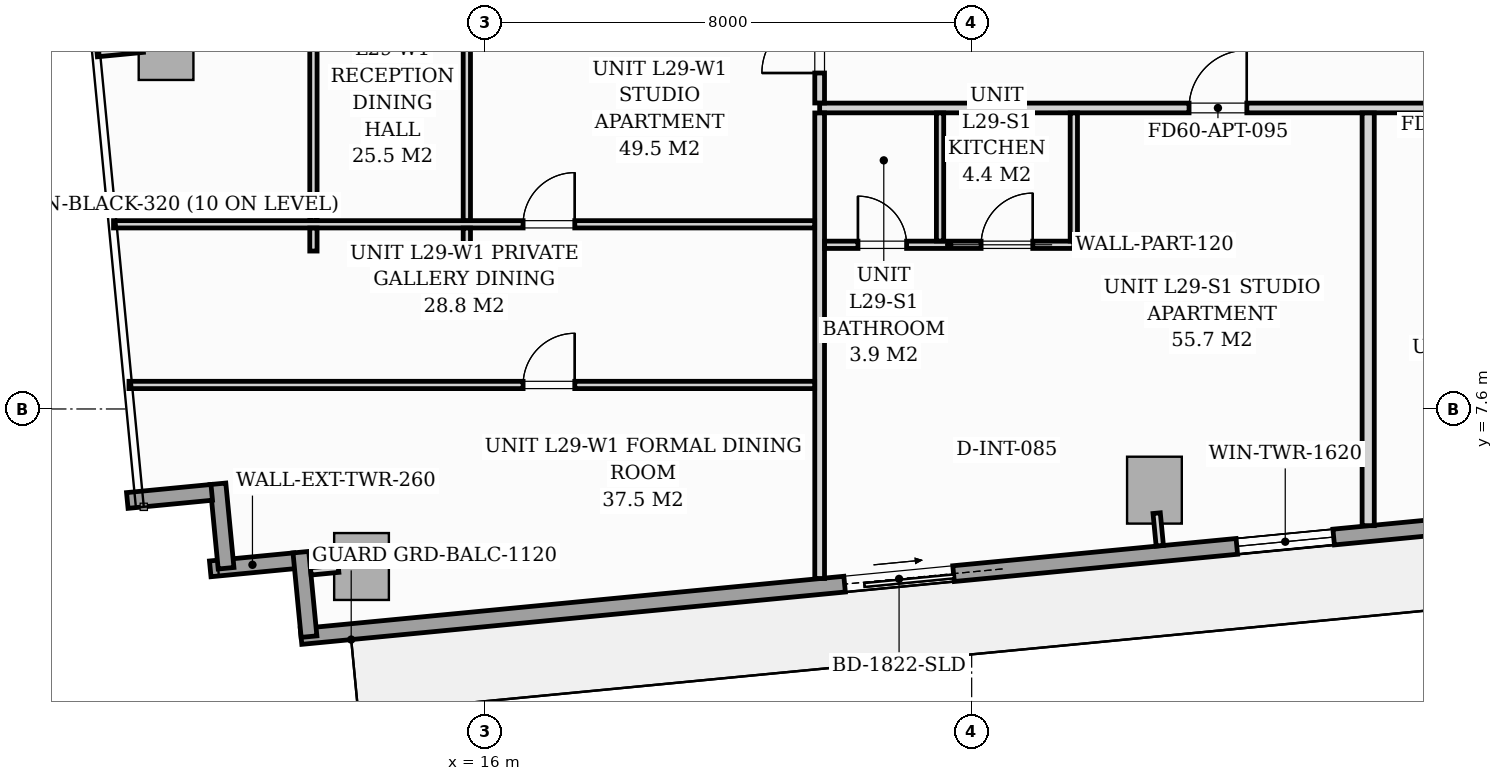
"""IFC4 building model, lengths in metres.
Left out: names, types, materials, properties, quantities, classifications, styles, units other than length and angle.
Written with IfcOpenShell. Run it as: python <this file> out.ifc"""

import sys

from ifc_helpers import new_model, si_unit, direction, frame, frame_2d, origin, origin_2d, place, context, subcontext, project, spatial, rectangle, extrude, source, transform, mapped, element, fill, save


model = new_model("IFC4")
c1 = context("Model", 3, precision=1e-05, world=origin(), true_north=direction((0.0, 1.0)))
c2 = subcontext(c1, "Body", "Model", "MODEL_VIEW")
j1 = project(units=[si_unit("LENGTHUNIT", "METRE"), si_unit("PLANEANGLEUNIT", "RADIAN")], contexts=[c1])
p1 = place(None, origin())
s1 = spatial("IfcSite", under=j1, at=p1, CompositionType="ELEMENT")
p2 = place(p1, origin())
s2 = spatial("IfcBuilding", under=s1, at=p2, CompositionType="ELEMENT")
p3 = place(p2, frame((0.0, 0.0, 103.4)))
s3 = spatial("IfcBuildingStorey", under=s2, at=p3, CompositionType="ELEMENT", Elevation=103.4)
m1 = source(origin(), c2, "Body", "SweptSolid", [
    extrude(rectangle(XDim=0.9, YDim=1.1, at=origin_2d()), origin(), (0.0, 0.0, 1.0), 3.196),
])
for number, where, z_axis, x_axis in (
    (1, (13.966, 5.01, 0.002), (0.0, 0.0, 1.0), (0.995, 0.096, 0.0)),
    (2, (27.006, 6.265, 0.002), (0.0, 0.0, 1.0), (0.995, 0.096, 0.0)),
    (3, (10.752, 13.561, 0.002), (0.0, 0.0, 1.0), (0.995, 0.096, 0.0)),
):
    element("IfcColumn", number, at=place(p3, frame(where, z_axis=z_axis, x_axis=x_axis)), inside=s3, PredefinedType="COLUMN", context=c2, shape_type="MappedRepresentation", body=[
        mapped(m1, transform((0.0, 0.0, 0.0), scale=1.0)),
    ])
for number, where, z_axis, x_axis in (
    (4, (12.867, 5.104, 0.0), (0.0, 0.0, 1.0), (-0.995, -0.096, 0.0)),
    (5, (11.739, 4.981, 0.0), (0.0, 0.0, 1.0), (-0.096, 0.995, 0.0)),
):
    element("IfcWall", number, at=place(p3, frame(where, z_axis=z_axis, x_axis=x_axis)), inside=s3, PredefinedType="STANDARD", context=c2, shape_type="SweptSolid", body=[
        extrude(rectangle(XDim=1.395, YDim=0.26, at=frame_2d((0.697, 0.0))), origin(), (0.0, 0.0, 1.0), 2.94),
    ])
p4 = place(p3, frame((11.503, 6.229, 0.0), z_axis=(0.0, 0.0, 1.0), x_axis=(-0.995391056452, -0.09589913835, 0.0)))
e6 = element("IfcWall", 6, at=p4, inside=s3, PredefinedType="STANDARD", context=c2, shape_type="SweptSolid", body=[
    extrude(rectangle(XDim=1.395, YDim=0.26, at=frame_2d((0.698, 0.0))), origin(), (0.0, 0.0, 1.0), 2.94),
])
p5 = place(p3, frame((31.994, 5.69, 0.0), z_axis=(0.0, 0.0, 1.0), x_axis=(-0.995396521236, -0.095842399342, 0.0)))
e7 = element("IfcWall", 7, at=p5, inside=s3, PredefinedType="STANDARD", context=c2, shape_type="SweptSolid", body=[
    extrude(rectangle(XDim=19.11, YDim=0.26, at=frame_2d((9.555, 0.0))), origin(), (0.0, 0.0, 1.0), 2.94),
])
p6 = place(p5, frame((8.33, 0.0, 0.0)))
e8 = element("IfcOpeningElement", 8, at=p6, cuts=e7, PredefinedType="OPENING", context=c2, shape_type="SweptSolid", body=[
    extrude(rectangle(XDim=1.8, YDim=2.06, at=frame_2d((0.9, 1.03))), frame((0.0, 0.14, 0.0), z_axis=(0.0, -1.0, 0.0), x_axis=(1.0, 0.0, 0.0)), (0.0, 0.0, 1.0), 0.28),
])
p7 = place(p5, frame((2.05, 0.0, 0.65)))
e9 = element("IfcOpeningElement", 9, at=p7, cuts=e7, PredefinedType="OPENING", context=c2, shape_type="SweptSolid", body=[
    extrude(rectangle(XDim=1.6, YDim=1.5, at=frame_2d((0.8, 0.75))), frame((0.0, 0.14, 0.0), z_axis=(0.0, -1.0, 0.0), x_axis=(1.0, 0.0, 0.0)), (0.0, 0.0, 1.0), 0.28),
])
p8 = place(p3, frame((13.103, 3.856, 0.0), z_axis=(0.0, 0.0, 1.0), x_axis=(-0.09589913835, 0.995391056452, 0.0)))
e10 = element("IfcWall", 10, at=p8, inside=s3, PredefinedType="STANDARD", context=c2, shape_type="SweptSolid", body=[
    extrude(rectangle(XDim=1.395, YDim=0.26, at=frame_2d((0.698, 0.0))), origin(), (0.0, 0.0, 1.0), 2.94),
])
p9 = place(p3, frame((21.5, 12.55, 0.0), z_axis=(0.0, 0.0, 1.0), x_axis=(1.0, 0.0, 0.0)))
e11 = element("IfcWall", 11, at=p9, inside=s3, PredefinedType="PARTITIONING", context=c2, shape_type="SweptSolid", body=[
    extrude(rectangle(XDim=24.38, YDim=0.16, at=frame_2d((12.19, 0.0))), origin(), (0.0, 0.0, 1.0), 2.94),
])
p10 = place(p9, frame((6.075, 0.0, 0.0)))
e12 = element("IfcOpeningElement", 12, at=p10, cuts=e11, PredefinedType="OPENING", context=c2, shape_type="SweptSolid", body=[
    extrude(rectangle(XDim=0.95, YDim=2.06, at=frame_2d((0.475, 1.03))), frame((0.0, 0.09, 0.0), z_axis=(0.0, -1.0, 0.0), x_axis=(1.0, 0.0, 0.0)), (0.0, 0.0, 1.0), 0.18),
])
p11 = place(p9, frame((10.519, 0.0, 0.0)))
e13 = element("IfcOpeningElement", 13, at=p11, cuts=e11, PredefinedType="OPENING", context=c2, shape_type="SweptSolid", body=[
    extrude(rectangle(XDim=0.95, YDim=2.06, at=frame_2d((0.475, 1.03))), frame((0.0, 0.09, 0.0), z_axis=(0.0, -1.0, 0.0), x_axis=(1.0, 0.0, 0.0)), (0.0, 0.0, 1.0), 0.18),
])
p12 = place(p9, frame((18.208, 0.0, 0.0)))
e14 = element("IfcOpeningElement", 14, at=p12, cuts=e11, PredefinedType="OPENING", context=c2, shape_type="SweptSolid", body=[
    extrude(rectangle(XDim=0.95, YDim=2.06, at=frame_2d((0.475, 1.03))), frame((0.0, 0.09, 0.0), z_axis=(0.0, -1.0, 0.0), x_axis=(1.0, 0.0, 0.0)), (0.0, 0.0, 1.0), 0.18),
])
p13 = place(p3, frame((21.5, 4.812, 0.0), z_axis=(0.0, 0.0, 1.0), x_axis=(0.0, 1.0, 0.0)))
e15 = element("IfcWall", 15, at=p13, inside=s3, PredefinedType="PARTITIONING", context=c2, shape_type="SweptSolid", body=[
    extrude(rectangle(XDim=7.656, YDim=0.16, at=frame_2d((3.828, 0.0))), origin(), (0.0, 0.0, 1.0), 2.94),
])
p14 = place(p3, frame((21.5, 12.632, 0.0), z_axis=(0.0, 0.0, 1.0), x_axis=(0.0, 1.0, 0.0)))
e16 = element("IfcWall", 16, at=p14, inside=s3, PredefinedType="PARTITIONING", context=c2, shape_type="SweptSolid", body=[
    extrude(rectangle(XDim=11.747, YDim=0.16, at=frame_2d((5.873, 0.0))), origin(), (0.0, 0.0, 1.0), 2.94),
])
p15 = place(p14, frame((0.493, 0.0, 0.0)))
e17 = element("IfcOpeningElement", 17, at=p15, cuts=e16, PredefinedType="OPENING", context=c2, shape_type="SweptSolid", body=[
    extrude(rectangle(XDim=0.95, YDim=2.06, at=frame_2d((0.475, 1.03))), frame((0.0, 0.09, 0.0), z_axis=(0.0, -1.0, 0.0), x_axis=(1.0, 0.0, 0.0)), (0.0, 0.0, 1.0), 0.18),
])
p16 = place(p3, frame((21.582, 10.3, 0.0), z_axis=(0.0, 0.0, 1.0), x_axis=(1.0, 0.0, 0.0)))
e18 = element("IfcWall", 18, at=p16, inside=s3, PredefinedType="PARTITIONING", context=c2, shape_type="SweptSolid", body=[
    extrude(rectangle(XDim=4.098, YDim=0.12, at=frame_2d((2.049, 0.0))), origin(), (0.0, 0.0, 1.0), 2.94),
])
p17 = place(p16, frame((0.548, 0.0, 0.0)))
e19 = element("IfcOpeningElement", 19, at=p17, cuts=e18, PredefinedType="OPENING", context=c2, shape_type="SweptSolid", body=[
    extrude(rectangle(XDim=0.8, YDim=2.02, at=frame_2d((0.4, 1.01))), frame((0.0, 0.07, 0.0), z_axis=(0.0, -1.0, 0.0), x_axis=(1.0, 0.0, 0.0)), (0.0, 0.0, 1.0), 0.14),
])
p18 = place(p16, frame((2.573, 0.0, 0.0)))
e20 = element("IfcOpeningElement", 20, at=p18, cuts=e18, PredefinedType="OPENING", context=c2, shape_type="SweptSolid", body=[
    extrude(rectangle(XDim=0.85, YDim=2.05, at=frame_2d((0.425, 1.025))), frame((0.0, 0.07, 0.0), z_axis=(0.0, -1.0, 0.0), x_axis=(1.0, 0.0, 0.0)), (0.0, 0.0, 1.0), 0.14),
])
for number, where, z_axis, x_axis in (
    (21, (25.68, 10.362, 0.0), (0.0, 0.0, 1.0), (0.0, 1.0, 0.0)),
    (22, (23.48, 10.362, 0.0), (0.0, 0.0, 1.0), (0.0, 1.0, 0.0)),
):
    element("IfcWall", number, at=place(p3, frame(where, z_axis=z_axis, x_axis=x_axis)), inside=s3, PredefinedType="PARTITIONING", context=c2, shape_type="SweptSolid", body=[
        extrude(rectangle(XDim=2.106, YDim=0.12, at=frame_2d((1.053, 0.0))), origin(), (0.0, 0.0, 1.0), 2.94),
    ])
p19 = place(p3, frame((30.521, 5.681, 0.0), z_axis=(0.0, 0.0, 1.0), x_axis=(0.0, 1.0, 0.0)))
e23 = element("IfcWall", 23, at=p19, inside=s3, PredefinedType="PARTITIONING", context=c2, shape_type="SweptSolid", body=[
    extrude(rectangle(XDim=6.787, YDim=0.2, at=frame_2d((3.394, 0.0))), origin(), (0.0, 0.0, 1.0), 2.94),
])
p20 = place(p3, frame((10.142, 7.995, 0.0), z_axis=(0.0, 0.0, 1.0), x_axis=(1.0, 0.0, 0.0)))
e24 = element("IfcWall", 24, at=p20, inside=s3, PredefinedType="PARTITIONING", context=c2, shape_type="SweptSolid", body=[
    extrude(rectangle(XDim=11.276, YDim=0.12, at=frame_2d((5.638, 0.0))), origin(), (0.0, 0.0, 1.0), 2.94),
])
p21 = place(p20, frame((6.481, 0.0, 0.0)))
e25 = element("IfcOpeningElement", 25, at=p21, cuts=e24, PredefinedType="OPENING", context=c2, shape_type="SweptSolid", body=[
    extrude(rectangle(XDim=0.85, YDim=2.05, at=frame_2d((0.425, 1.025))), frame((0.0, 0.07, 0.0), z_axis=(0.0, -1.0, 0.0), x_axis=(1.0, 0.0, 0.0)), (0.0, 0.0, 1.0), 0.14),
])
p22 = place(p3, frame((9.888, 10.637, 0.0), z_axis=(0.0, 0.0, 1.0), x_axis=(1.0, 0.0, 0.0)))
e26 = element("IfcWall", 26, at=p22, inside=s3, PredefinedType="PARTITIONING", context=c2, shape_type="SweptSolid", body=[
    extrude(rectangle(XDim=11.53, YDim=0.12, at=frame_2d((5.765, 0.0))), origin(), (0.0, 0.0, 1.0), 2.94),
])
p23 = place(p22, frame((6.735, 0.0, 0.0)))
e27 = element("IfcOpeningElement", 27, at=p23, cuts=e26, PredefinedType="OPENING", context=c2, shape_type="SweptSolid", body=[
    extrude(rectangle(XDim=0.85, YDim=2.05, at=frame_2d((0.425, 1.025))), frame((0.0, 0.07, 0.0), z_axis=(0.0, -1.0, 0.0), x_axis=(1.0, 0.0, 0.0)), (0.0, 0.0, 1.0), 0.14),
])
p24 = place(p3, frame((13.175, 10.197, 0.0), z_axis=(0.0, 0.0, 1.0), x_axis=(0.0, 1.0, 0.0)))
e28 = element("IfcWall", 28, at=p24, inside=s3, PredefinedType="PARTITIONING", context=c2, shape_type="SweptSolid", body=[
    extrude(rectangle(XDim=0.378, YDim=0.12, at=frame_2d((0.189, 0.0))), origin(), (0.0, 0.0, 1.0), 2.94),
])
p25 = place(p3, frame((13.175, 10.699, 0.0), z_axis=(0.0, 0.0, 1.0), x_axis=(0.0, 1.0, 0.0)))
e29 = element("IfcWall", 29, at=p25, inside=s3, PredefinedType="PARTITIONING", context=c2, shape_type="SweptSolid", body=[
    extrude(rectangle(XDim=10.61, YDim=0.12, at=frame_2d((5.305, 0.0))), origin(), (0.0, 0.0, 1.0), 2.94),
])
p26 = place(p25, frame((4.88, 0.0, 0.0)))
e30 = element("IfcOpeningElement", 30, at=p26, cuts=e29, PredefinedType="OPENING", context=c2, shape_type="SweptSolid", body=[
    extrude(rectangle(XDim=0.85, YDim=2.05, at=frame_2d((0.425, 1.025))), frame((0.0, 0.07, 0.0), z_axis=(0.0, -1.0, 0.0), x_axis=(1.0, 0.0, 0.0)), (0.0, 0.0, 1.0), 0.14),
])
p27 = place(p3, frame((15.698, 10.197, 0.0), z_axis=(0.0, 0.0, 1.0), x_axis=(0.0, 1.0, 0.0)))
e31 = element("IfcWall", 31, at=p27, inside=s3, PredefinedType="PARTITIONING", context=c2, shape_type="SweptSolid", body=[
    extrude(rectangle(XDim=0.378, YDim=0.12, at=frame_2d((0.189, 0.0))), origin(), (0.0, 0.0, 1.0), 2.94),
])
p28 = place(p3, frame((15.698, 10.699, 0.0), z_axis=(0.0, 0.0, 1.0), x_axis=(0.0, 1.0, 0.0)))
e32 = element("IfcWall", 32, at=p28, inside=s3, PredefinedType="PARTITIONING", context=c2, shape_type="SweptSolid", body=[
    extrude(rectangle(XDim=10.61, YDim=0.12, at=frame_2d((5.305, 0.0))), origin(), (0.0, 0.0, 1.0), 2.94),
])
p29 = place(p28, frame((4.88, 0.0, 0.0)))
e33 = element("IfcOpeningElement", 33, at=p29, cuts=e32, PredefinedType="OPENING", context=c2, shape_type="SweptSolid", body=[
    extrude(rectangle(XDim=0.85, YDim=2.05, at=frame_2d((0.425, 1.025))), frame((0.0, 0.07, 0.0), z_axis=(0.0, -1.0, 0.0), x_axis=(1.0, 0.0, 0.0)), (0.0, 0.0, 1.0), 0.14),
])
p30 = place(p3, frame((13.588, 4.973, 0.0), z_axis=(0.0, 0.0, 1.0), x_axis=(-0.995435366701, -0.095438098896, 0.0)))
e34 = element("IfcWall", 34, at=p30, inside=s3, PredefinedType="PARTITIONING", context=c2, shape_type="SweptSolid", body=[
    extrude(rectangle(XDim=0.458, YDim=0.12, at=frame_2d((0.229, 0.0))), origin(), (0.0, 0.0, 1.0), 2.94),
])
p31 = place(p3, frame((27.042, 5.887, 0.0), z_axis=(0.0, 0.0, 1.0), x_axis=(0.096222656154, -0.995359834654, 0.0)))
e35 = element("IfcWall", 35, at=p31, inside=s3, PredefinedType="PARTITIONING", context=c2, shape_type="SweptSolid", body=[
    extrude(rectangle(XDim=0.538, YDim=0.12, at=frame_2d((0.269, 0.0))), origin(), (0.0, 0.0, 1.0), 2.94),
])
p32 = place(p3, frame((10.373, 13.524, 0.0), z_axis=(0.0, 0.0, 1.0), x_axis=(-0.995377786728, -0.096036772582, 0.0)))
e36 = element("IfcWall", 36, at=p32, inside=s3, PredefinedType="PARTITIONING", context=c2, shape_type="SweptSolid", body=[
    extrude(rectangle(XDim=0.76, YDim=0.12, at=frame_2d((0.38, 0.0))), origin(), (0.0, 0.0, 1.0), 2.94),
])
m2 = source(origin(), c2, "Body", "SweptSolid", [
    extrude(rectangle(XDim=1.8, YDim=2.06, at=frame_2d((0.9, 1.03))), frame((0.0, 0.025, 0.0), z_axis=(0.0, -1.0, 0.0), x_axis=(1.0, 0.0, 0.0)), (0.0, 0.0, 1.0), 0.05),
])
p33 = place(p6, origin())
e37 = element("IfcDoor", 37, at=p33, inside=s3, OperationType="SLIDING_TO_LEFT", PredefinedType="DOOR", context=c2, shape_type="MappedRepresentation", body=[
    mapped(m2, transform((0.0, 0.0, 0.0), scale=1.0)),
])
fill(e8, e37)
m3 = source(origin(), c2, "Body", "SweptSolid", [
    extrude(rectangle(XDim=1.6, YDim=1.5, at=frame_2d((0.8, 0.75))), frame((0.0, 0.03, 0.0), z_axis=(0.0, -1.0, 0.0), x_axis=(1.0, 0.0, 0.0)), (0.0, 0.0, 1.0), 0.06),
])
p34 = place(p7, origin())
e38 = element("IfcWindow", 38, at=p34, inside=s3, PartitioningType="SINGLE_PANEL", PredefinedType="WINDOW", context=c2, shape_type="MappedRepresentation", body=[
    mapped(m3, transform((0.0, 0.0, 0.0), scale=1.0)),
])
fill(e9, e38)
m4 = source(origin(), c2, "Body", "SweptSolid", [
    extrude(rectangle(XDim=0.95, YDim=2.06, at=frame_2d((0.475, 1.03))), frame((0.0, 0.025, 0.0), z_axis=(0.0, -1.0, 0.0), x_axis=(1.0, 0.0, 0.0)), (0.0, 0.0, 1.0), 0.05),
])
p35 = place(p10, origin())
e39 = element("IfcDoor", 39, at=p35, inside=s3, OperationType="SINGLE_SWING_RIGHT", PredefinedType="DOOR", context=c2, shape_type="MappedRepresentation", body=[
    mapped(m4, transform((0.0, 0.0, 0.0), scale=1.0)),
])
fill(e12, e39)
m5 = source(origin(), c2, "Body", "SweptSolid", [
    extrude(rectangle(XDim=0.8, YDim=2.02, at=frame_2d((0.4, 1.01))), frame((0.0, 0.025, 0.0), z_axis=(0.0, -1.0, 0.0), x_axis=(1.0, 0.0, 0.0)), (0.0, 0.0, 1.0), 0.05),
])
p36 = place(p17, origin())
e40 = element("IfcDoor", 40, at=p36, inside=s3, OperationType="SINGLE_SWING_LEFT", PredefinedType="DOOR", context=c2, shape_type="MappedRepresentation", body=[
    mapped(m5, transform((0.0, 0.0, 0.0), scale=1.0)),
])
fill(e19, e40)
m6 = source(origin(), c2, "Body", "SweptSolid", [
    extrude(rectangle(XDim=0.85, YDim=2.05, at=frame_2d((0.425, 1.025))), frame((0.0, 0.025, 0.0), z_axis=(0.0, -1.0, 0.0), x_axis=(1.0, 0.0, 0.0)), (0.0, 0.0, 1.0), 0.05),
])
p37 = place(p18, origin())
e41 = element("IfcDoor", 41, at=p37, inside=s3, OperationType="SINGLE_SWING_RIGHT", PredefinedType="DOOR", context=c2, shape_type="MappedRepresentation", body=[
    mapped(m6, transform((0.0, 0.0, 0.0), scale=1.0)),
])
fill(e20, e41)
p38 = place(p15, origin())
e42 = element("IfcDoor", 42, at=p38, inside=s3, OperationType="SINGLE_SWING_LEFT", PredefinedType="DOOR", context=c2, shape_type="MappedRepresentation", body=[
    mapped(m4, transform((0.0, 0.0, 0.0), scale=1.0)),
])
fill(e17, e42)
p39 = place(p21, origin())
e43 = element("IfcDoor", 43, at=p39, inside=s3, OperationType="SINGLE_SWING_RIGHT", PredefinedType="DOOR", context=c2, shape_type="MappedRepresentation", body=[
    mapped(m6, transform((0.0, 0.0, 0.0), scale=1.0)),
])
fill(e25, e43)
p40 = place(p23, origin())
e44 = element("IfcDoor", 44, at=p40, inside=s3, OperationType="SINGLE_SWING_RIGHT", PredefinedType="DOOR", context=c2, shape_type="MappedRepresentation", body=[
    mapped(m6, transform((0.0, 0.0, 0.0), scale=1.0)),
])
fill(e27, e44)
save(model, sys.argv[1])
